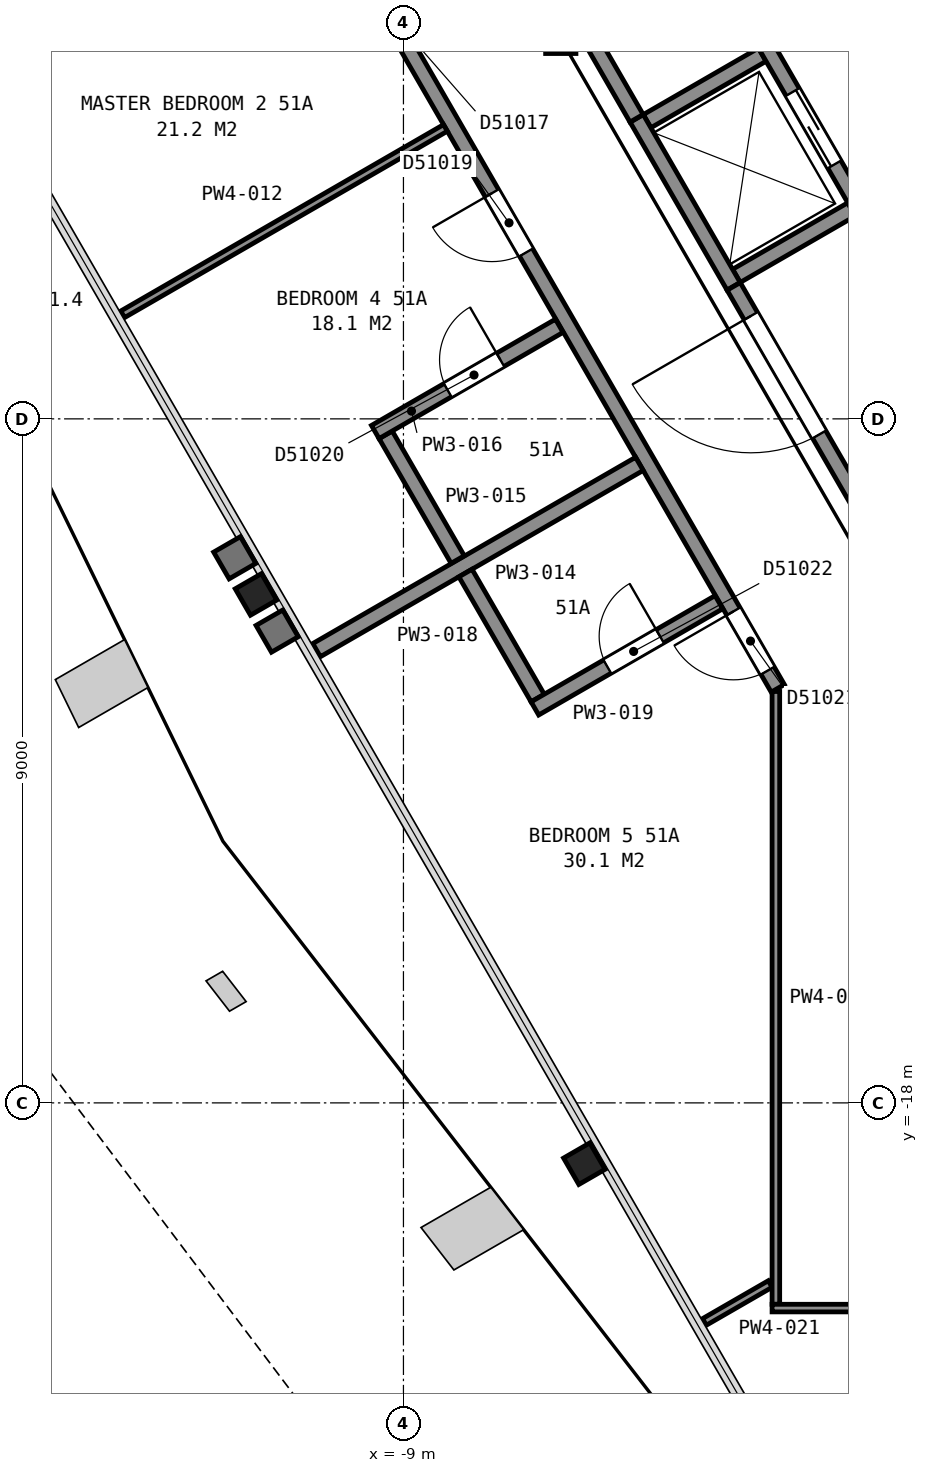
"""IFC4 building model, lengths in metres.
Left out: names, types, materials, properties, quantities, classifications, styles, units other than length and angle.
Written with IfcOpenShell. Run it as: python <this file> out.ifc"""

import sys

from ifc_helpers import new_model, si_unit, direction, frame, frame_2d, origin, origin_2d, place, context, subcontext, project, spatial, rectangle, i_section, extrude, element, fill, save


model = new_model("IFC4")
c1 = context("Model", 3, precision=1e-05, world=origin(), true_north=direction((0.0, 1.0)))
c2 = subcontext(c1, "Body", "Model", "MODEL_VIEW")
j1 = project(units=[si_unit("LENGTHUNIT", "METRE"), si_unit("PLANEANGLEUNIT", "RADIAN")], contexts=[c1])
p1 = place(None, origin())
s1 = spatial("IfcSite", under=j1, at=p1, CompositionType="ELEMENT")
p2 = place(p1, origin())
s2 = spatial("IfcBuilding", under=s1, at=p2, CompositionType="ELEMENT")
p3 = place(p2, frame((0.0, 0.0, 206.4)))
s3 = spatial("IfcBuildingStorey", under=s2, at=p3, CompositionType="ELEMENT", Elevation=206.4)
for number, where, z_axis, x_axis in (
    (1, (-10.94, -11.31, 0.0), (0.0, 0.0, 1.0), (-0.5, 0.866, 0.0)),
    (2, (-6.62, -18.8, 0.0), (0.0, 0.0, 1.0), (-0.5, 0.866, 0.0)),
):
    element("IfcColumn", number, at=place(p3, frame(where, z_axis=z_axis, x_axis=x_axis)), inside=s3, PredefinedType="COLUMN", context=c2, shape_type="SweptSolid", body=[
        extrude(i_section(OverallWidth=0.401, OverallDepth=0.399, WebThickness=0.025, FlangeThickness=0.04, FilletRadius=0.015, at=origin_2d()), origin(), (0.0, 0.0, 1.0), 3.7),
    ])
p4 = place(p3, frame((-6.93, -4.0, 0.0), z_axis=(0.0, 0.0, 1.0), x_axis=(1.0, 0.0, 0.0)))
e3 = element("IfcColumn", 3, at=p4, inside=s3, PredefinedType="COLUMN", context=c2, shape_type="SweptSolid", body=[
    extrude(i_section(OverallWidth=0.399, OverallDepth=0.386, WebThickness=0.021, FlangeThickness=0.033, FilletRadius=0.015, at=origin_2d()), origin(), (0.0, 0.0, 1.0), 3.7),
])
for number, where, z_axis, x_axis in (
    (4, (-4.62, -7.118, 0.0), (0.0, 0.0, 1.0), (0.866, 0.5, 0.0)),
    (5, (-5.795, -5.083, 0.0), (0.0, 0.0, 1.0), (0.866, 0.5, 0.0)),
):
    element("IfcWall", number, at=place(p3, frame(where, z_axis=z_axis, x_axis=x_axis)), inside=s3, PredefinedType="PARTITIONING", context=c2, shape_type="SweptSolid", body=[
        extrude(rectangle(XDim=1.75, YDim=0.2, at=frame_2d((0.875, 0.0))), origin(), (0.0, 0.0, 1.0), 3.7),
    ])
p5 = place(p3, frame((-2.968, -6.28, 0.0), z_axis=(0.0, 0.0, 1.0), x_axis=(-0.499990435942, 0.866030925526, 0.0)))
e6 = element("IfcWall", 6, at=p5, inside=s3, PredefinedType="PARTITIONING", context=c2, shape_type="SweptSolid", body=[
    extrude(rectangle(XDim=2.55, YDim=0.2, at=frame_2d((1.275, 0.0))), origin(), (0.0, 0.0, 1.0), 3.7),
])
p6 = place(p5, frame((0.725, 0.0, 0.0)))
e7 = element("IfcOpeningElement", 7, at=p6, cuts=e6, PredefinedType="OPENING", context=c2, shape_type="SweptSolid", body=[
    extrude(rectangle(XDim=1.1, YDim=2.1, at=frame_2d((0.55, 1.05))), frame((0.0, 0.11, 0.0), z_axis=(0.0, -1.0, 0.0), x_axis=(1.0, 0.0, 0.0)), (0.0, 0.0, 1.0), 0.22),
])
p7 = place(p3, frame((-4.656, -7.255, 0.0), z_axis=(0.0, 0.0, 1.0), x_axis=(-0.499990435942, 0.866030925526, 0.0)))
e8 = element("IfcWall", 8, at=p7, inside=s3, PredefinedType="PARTITIONING", context=c2, shape_type="SweptSolid", body=[
    extrude(rectangle(XDim=2.55, YDim=0.2, at=frame_2d((1.275, 0.0))), origin(), (0.0, 0.0, 1.0), 3.7),
])
p8 = place(p3, frame((-7.005, -3.187, 0.0), z_axis=(0.0, 0.0, 1.0), x_axis=(0.499689606989, -0.866204535123, 0.0)))
e9 = element("IfcWall", 9, at=p8, inside=s3, PredefinedType="PARTITIONING", context=c2, shape_type="SweptSolid", body=[
    extrude(rectangle(XDim=2.145, YDim=0.2, at=frame_2d((1.072, 0.0))), origin(), (0.0, 0.0, 1.0), 3.45),
])
p9 = place(p3, frame((-4.655, -7.257, 0.0), z_axis=(0.0, 0.0, 1.0), x_axis=(0.499966124405, -0.866044960985, 0.0)))
e10 = element("IfcWall", 10, at=p9, inside=s3, PredefinedType="PARTITIONING", context=c2, shape_type="SweptSolid", body=[
    extrude(rectangle(XDim=5.956, YDim=0.2, at=frame_2d((2.978, 0.0))), origin(), (0.0, 0.0, 1.0), 3.45),
])
p10 = place(p9, frame((0.45, 0.0, 0.0)))
e11 = element("IfcOpeningElement", 11, at=p10, cuts=e10, PredefinedType="OPENING", context=c2, shape_type="SweptSolid", body=[
    extrude(rectangle(XDim=1.8, YDim=2.1, at=frame_2d((0.9, 1.05))), frame((0.0, 0.11, 0.0), z_axis=(0.0, -1.0, 0.0), x_axis=(1.0, 0.0, 0.0)), (0.0, 0.0, 1.0), 0.22),
])
p11 = place(p3, frame((-4.075, -12.545, 0.0), z_axis=(0.0, 0.0, 1.0), x_axis=(-0.499999743747, 0.866025551732, 0.0)))
e12 = element("IfcWall", 12, at=p11, inside=s3, PredefinedType="PARTITIONING", context=c2, shape_type="SweptSolid", body=[
    extrude(rectangle(XDim=17.656, YDim=0.2, at=frame_2d((8.828, 0.0))), origin(), (0.0, 0.0, 1.0), 2.713),
])
p12 = place(p11, frame((9.895, 0.0, 0.0)))
e13 = element("IfcOpeningElement", 13, at=p12, cuts=e12, PredefinedType="OPENING", context=c2, shape_type="SweptSolid", body=[
    extrude(rectangle(XDim=0.9, YDim=2.1, at=frame_2d((0.45, 1.05))), frame((0.0, 0.11, 0.0), z_axis=(0.0, -1.0, 0.0), x_axis=(1.0, 0.0, 0.0)), (0.0, 0.0, 1.0), 0.22),
])
p13 = place(p11, frame((6.622, 0.0, 0.0)))
e14 = element("IfcOpeningElement", 14, at=p13, cuts=e12, PredefinedType="OPENING", context=c2, shape_type="SweptSolid", body=[
    extrude(rectangle(XDim=0.9, YDim=2.1, at=frame_2d((0.45, 1.05))), frame((0.0, 0.11, 0.0), z_axis=(0.0, -1.0, 0.0), x_axis=(1.0, 0.0, 0.0)), (0.0, 0.0, 1.0), 0.22),
])
p14 = place(p11, frame((0.268, 0.0, 0.0)))
e15 = element("IfcOpeningElement", 15, at=p14, cuts=e12, PredefinedType="OPENING", context=c2, shape_type="SweptSolid", body=[
    extrude(rectangle(XDim=0.9, YDim=2.1, at=frame_2d((0.45, 1.05))), frame((0.0, 0.11, 0.0), z_axis=(0.0, -1.0, 0.0), x_axis=(1.0, 0.0, 0.0)), (0.0, 0.0, 1.0), 0.22),
])
p15 = place(p3, frame((-12.694, -7.624, 0.0), z_axis=(0.0, 0.0, 1.0), x_axis=(0.865991567799, 0.500058601068, 0.0)))
e16 = element("IfcWall", 16, at=p15, inside=s3, PredefinedType="PARTITIONING", context=c2, shape_type="SweptSolid", body=[
    extrude(rectangle(XDim=4.904, YDim=0.1, at=frame_2d((2.452, 0.0))), origin(), (0.0, 0.0, 1.0), 2.713),
])
p16 = place(p3, frame((-10.143, -12.043, 0.0), z_axis=(0.0, 0.0, 1.0), x_axis=(0.866136679459, 0.49980721533, 0.0)))
e17 = element("IfcWall", 17, at=p16, inside=s3, PredefinedType="PARTITIONING", context=c2, shape_type="SweptSolid", body=[
    extrude(rectangle(XDim=4.904, YDim=0.2, at=frame_2d((2.452, 0.0))), origin(), (0.0, 0.0, 1.0), 2.713),
])
p17 = place(p3, frame((-9.234, -9.21, 0.0), z_axis=(0.0, 0.0, 1.0), x_axis=(0.499949193323, -0.866054735046, 0.0)))
e18 = element("IfcWall", 18, at=p17, inside=s3, PredefinedType="PARTITIONING", context=c2, shape_type="SweptSolid", body=[
    extrude(rectangle(XDim=1.895, YDim=0.2, at=frame_2d((0.948, 0.0))), origin(), (0.0, 0.0, 1.0), 2.713),
])
p18 = place(p3, frame((-6.95, -7.775, 0.0), z_axis=(0.0, 0.0, 1.0), x_axis=(-0.866003766563, -0.500037474894, 0.0)))
e19 = element("IfcWall", 19, at=p18, inside=s3, PredefinedType="PARTITIONING", context=c2, shape_type="SweptSolid", body=[
    extrude(rectangle(XDim=2.795, YDim=0.2, at=frame_2d((1.397, 0.0))), origin(), (0.0, 0.0, 1.0), 2.713),
])
p19 = place(p18, frame((0.895, 0.0, 0.0)))
e20 = element("IfcOpeningElement", 20, at=p19, cuts=e19, PredefinedType="OPENING", context=c2, shape_type="SweptSolid", body=[
    extrude(rectangle(XDim=0.8, YDim=2.1, at=frame_2d((0.4, 1.05))), frame((0.0, 0.11, 0.0), z_axis=(0.0, -1.0, 0.0), x_axis=(1.0, 0.0, 0.0)), (0.0, 0.0, 1.0), 0.22),
])
p20 = place(p3, frame((-8.184, -11.029, 0.0), z_axis=(0.0, 0.0, 1.0), x_axis=(0.500134112126, -0.865947960265, 0.0)))
e21 = element("IfcWall", 21, at=p20, inside=s3, PredefinedType="PARTITIONING", context=c2, shape_type="SweptSolid", body=[
    extrude(rectangle(XDim=1.899, YDim=0.2, at=frame_2d((0.95, 0.0))), origin(), (0.0, 0.0, 1.0), 2.713),
])
p21 = place(p3, frame((-7.271, -12.81, 0.0), z_axis=(0.0, 0.0, 1.0), x_axis=(0.866041588165, 0.499971966783, 0.0)))
e22 = element("IfcWall", 22, at=p21, inside=s3, PredefinedType="PARTITIONING", context=c2, shape_type="SweptSolid", body=[
    extrude(rectangle(XDim=2.795, YDim=0.2, at=frame_2d((1.397, 0.0))), origin(), (0.0, 0.0, 1.0), 2.713),
])
p22 = place(p21, frame((1.1, 0.0, 0.0)))
e23 = element("IfcOpeningElement", 23, at=p22, cuts=e22, PredefinedType="OPENING", context=c2, shape_type="SweptSolid", body=[
    extrude(rectangle(XDim=0.8, YDim=2.1, at=frame_2d((0.4, 1.05))), frame((0.0, 0.11, 0.0), z_axis=(0.0, -1.0, 0.0), x_axis=(1.0, 0.0, 0.0)), (0.0, 0.0, 1.0), 0.22),
])
p23 = place(p3, frame((-5.04, -20.882, 0.0), z_axis=(0.0, 0.0, 1.0), x_axis=(0.866234439787, 0.499637764112, 0.0)))
e24 = element("IfcWall", 24, at=p23, inside=s3, PredefinedType="PARTITIONING", context=c2, shape_type="SweptSolid", body=[
    extrude(rectangle(XDim=0.998, YDim=0.1, at=frame_2d((0.499, 0.0))), origin(), (0.0, 0.0, 1.0), 2.713),
])
p24 = place(p3, frame((-4.1, -20.65, 0.0), z_axis=(0.0, 0.0, 1.0), x_axis=(0.0, 1.0, 0.0)))
e25 = element("IfcWall", 25, at=p24, inside=s3, PredefinedType="PARTITIONING", context=c2, shape_type="SweptSolid", body=[
    extrude(rectangle(XDim=8.063, YDim=0.1, at=frame_2d((4.031, 0.0))), origin(), (0.0, 0.0, 1.0), 2.713),
])
p25 = place(p3, frame((4.15, -20.7, 0.0), z_axis=(0.0, 0.0, 1.0), x_axis=(-1.0, 0.0, 0.0)))
e26 = element("IfcWall", 26, at=p25, inside=s3, PredefinedType="PARTITIONING", context=c2, shape_type="SweptSolid", body=[
    extrude(rectangle(XDim=8.3, YDim=0.1, at=frame_2d((4.15, 0.0))), origin(), (0.0, 0.0, 1.0), 2.713),
])
p26 = place(p25, frame((3.55, 0.0, 0.0)))
e27 = element("IfcOpeningElement", 27, at=p26, cuts=e26, PredefinedType="OPENING", context=c2, shape_type="SweptSolid", body=[
    extrude(rectangle(XDim=1.2, YDim=2.1, at=frame_2d((0.6, 1.05))), frame((0.0, 0.06, 0.0), z_axis=(0.0, -1.0, 0.0), x_axis=(1.0, 0.0, 0.0)), (0.0, 0.0, 1.0), 0.12),
])
p27 = place(p6, origin())
e28 = element("IfcDoor", 28, at=p27, inside=s3, OperationType="SLIDING_TO_RIGHT", PredefinedType="DOOR", context=c2, shape_type="SweptSolid", body=[
    extrude(rectangle(XDim=1.1, YDim=2.1, at=frame_2d((0.55, 1.05))), frame((0.0, 0.025, 0.0), z_axis=(0.0, -1.0, 0.0), x_axis=(1.0, 0.0, 0.0)), (0.0, 0.0, 1.0), 0.05),
])
fill(e7, e28)
p28 = place(p10, origin())
e29 = element("IfcDoor", 29, at=p28, inside=s3, OperationType="DOUBLE_DOOR_SINGLE_SWING", PredefinedType="DOOR", context=c2, shape_type="SweptSolid", body=[
    extrude(rectangle(XDim=1.8, YDim=2.1, at=frame_2d((0.9, 1.05))), frame((0.0, 0.025, 0.0), z_axis=(0.0, -1.0, 0.0), x_axis=(1.0, 0.0, 0.0)), (0.0, 0.0, 1.0), 0.05),
])
fill(e11, e29)
p29 = place(p13, origin())
e30 = element("IfcDoor", 30, at=p29, inside=s3, OperationType="SINGLE_SWING_RIGHT", PredefinedType="DOOR", context=c2, shape_type="SweptSolid", body=[
    extrude(rectangle(XDim=0.9, YDim=2.1, at=frame_2d((0.45, 1.05))), frame((0.0, 0.025, 0.0), z_axis=(0.0, -1.0, 0.0), x_axis=(1.0, 0.0, 0.0)), (0.0, 0.0, 1.0), 0.05),
])
fill(e14, e30)
p30 = place(p14, origin())
e31 = element("IfcDoor", 31, at=p30, inside=s3, OperationType="SINGLE_SWING_RIGHT", PredefinedType="DOOR", context=c2, shape_type="SweptSolid", body=[
    extrude(rectangle(XDim=0.9, YDim=2.1, at=frame_2d((0.45, 1.05))), frame((0.0, 0.025, 0.0), z_axis=(0.0, -1.0, 0.0), x_axis=(1.0, 0.0, 0.0)), (0.0, 0.0, 1.0), 0.05),
])
fill(e15, e31)
p31 = place(p19, origin())
e32 = element("IfcDoor", 32, at=p31, inside=s3, OperationType="SINGLE_SWING_LEFT", PredefinedType="DOOR", context=c2, shape_type="SweptSolid", body=[
    extrude(rectangle(XDim=0.8, YDim=2.1, at=frame_2d((0.4, 1.05))), frame((0.0, 0.025, 0.0), z_axis=(0.0, -1.0, 0.0), x_axis=(1.0, 0.0, 0.0)), (0.0, 0.0, 1.0), 0.05),
])
fill(e20, e32)
p32 = place(p22, origin())
e33 = element("IfcDoor", 33, at=p32, inside=s3, OperationType="SINGLE_SWING_RIGHT", PredefinedType="DOOR", context=c2, shape_type="SweptSolid", body=[
    extrude(rectangle(XDim=0.8, YDim=2.1, at=frame_2d((0.4, 1.05))), frame((0.0, 0.025, 0.0), z_axis=(0.0, -1.0, 0.0), x_axis=(1.0, 0.0, 0.0)), (0.0, 0.0, 1.0), 0.05),
])
fill(e23, e33)
save(model, sys.argv[1])
